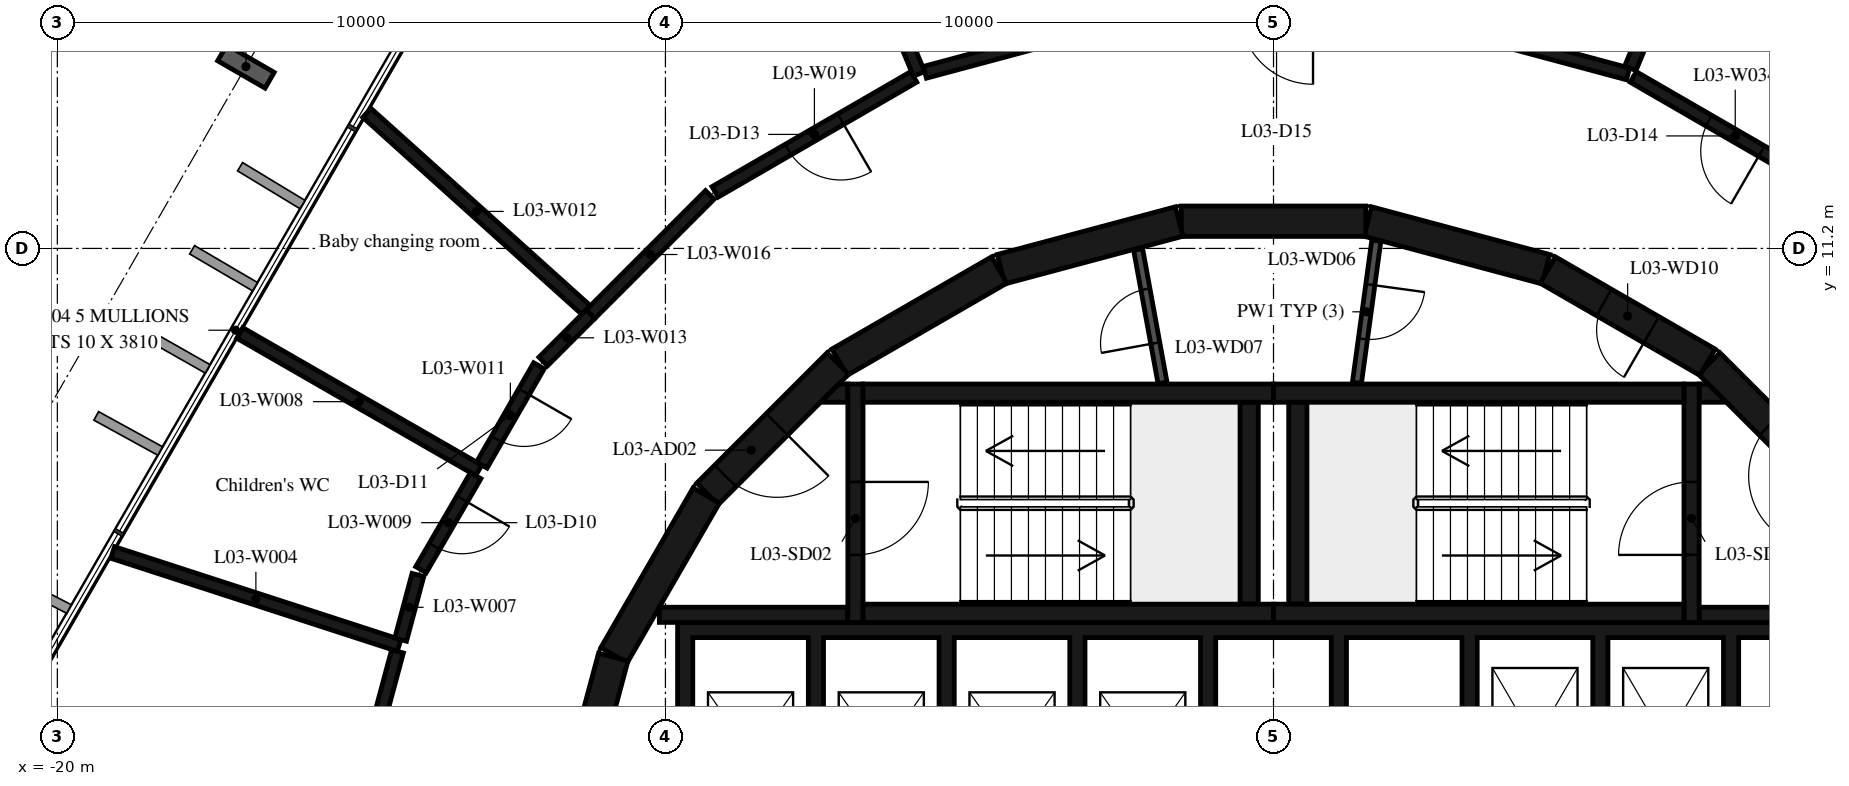
"""IFC4 building model, lengths in metres.
Left out: names, types, materials, properties, quantities, classifications, styles, units other than length and angle.
Written with IfcOpenShell. Run it as: python <this file> out.ifc"""

import sys

from ifc_helpers import new_model, si_unit, direction, frame, frame_2d, origin, origin_2d, place, context, subcontext, project, spatial, polyline, rectangle, i_section, outline, extrude, element, fill, save


model = new_model("IFC4")
c1 = context("Model", 3, precision=1e-05, world=origin(), true_north=direction((0.0, 1.0)))
c2 = subcontext(c1, "Body", "Model", "MODEL_VIEW")
j1 = project(units=[si_unit("LENGTHUNIT", "METRE"), si_unit("PLANEANGLEUNIT", "RADIAN")], contexts=[c1])
p1 = place(None, origin())
s1 = spatial("IfcSite", under=j1, at=p1, CompositionType="ELEMENT")
p2 = place(p1, origin())
s2 = spatial("IfcBuilding", under=s1, at=p2, CompositionType="ELEMENT")
p3 = place(p2, frame((0.0, 0.0, 18.6)))
s3 = spatial("IfcBuildingStorey", under=s2, at=p3, CompositionType="ELEMENT", Elevation=18.6)
p4 = place(p3, frame((-16.899, 14.19, -0.38), z_axis=(0.0, 0.0, 1.0), x_axis=(0.50000017485, 0.866025302835, 0.0)))
e1 = element("IfcColumn", 1, at=p4, inside=s3, PredefinedType="COLUMN", context=c2, shape_type="SweptSolid", body=[
    extrude(i_section(OverallWidth=0.3, OverallDepth=0.9, WebThickness=0.019, FlangeThickness=0.035, FilletRadius=0.03, at=origin_2d()), origin(), (0.0, 0.0, 1.0), 4.8),
])
p5 = place(p3, frame((9.308, 7.164, 0.0), z_axis=(0.0, 0.0, 1.0), x_axis=(-0.707106781187, 0.707106781187, 0.0)))
e2 = element("IfcWall", 2, at=p5, inside=s3, PredefinedType="SHEAR", context=c2, shape_type="SweptSolid", body=[
    extrude(rectangle(XDim=3.032, YDim=0.5, at=frame_2d((1.516, 0.0))), origin(), (0.0, 0.0, 1.0), 4.42),
])
p6 = place(p5, frame((0.416, 0.0, 0.0)))
e3 = element("IfcOpeningElement", 3, at=p6, cuts=e2, PredefinedType="OPENING", context=c2, shape_type="SweptSolid", body=[
    extrude(rectangle(XDim=1.2, YDim=2.1, at=frame_2d((0.6, 1.05))), frame((0.0, 0.26, 0.0), z_axis=(0.0, -1.0, 0.0), x_axis=(1.0, 0.0, 0.0)), (0.0, 0.0, 1.0), 0.52),
])
p7 = place(p3, frame((7.137, 9.329, 0.0), z_axis=(0.0, 0.0, 1.0), x_axis=(-0.865975092491, 0.500087131594, 0.0)))
e4 = element("IfcWall", 4, at=p7, inside=s3, PredefinedType="SHEAR", context=c2, shape_type="SweptSolid", body=[
    extrude(rectangle(XDim=3.033, YDim=0.5, at=frame_2d((1.516, 0.0))), origin(), (0.0, 0.0, 1.0), 4.42),
])
p8 = place(p7, frame((1.066, 0.0, 0.0)))
e5 = element("IfcOpeningElement", 5, at=p8, cuts=e4, PredefinedType="OPENING", context=c2, shape_type="SweptSolid", body=[
    extrude(rectangle(XDim=0.9, YDim=2.1, at=frame_2d((0.45, 1.05))), frame((0.0, 0.26, 0.0), z_axis=(0.0, -1.0, 0.0), x_axis=(1.0, 0.0, 0.0)), (0.0, 0.0, 1.0), 0.52),
])
for number, where, z_axis, x_axis in (
    (6, (4.479, 10.858, 0.0), (0.0, 0.0, 1.0), (-0.966, 0.259, 0.0)),
    (7, (1.516, 11.647, 0.0), (0.0, 0.0, 1.0), (-1.0, 0.0, 0.0)),
    (8, (-1.55, 11.643, 0.0), (0.0, 0.0, 1.0), (-0.966, -0.259, 0.0)),
    (9, (-4.51, 10.845, 0.0), (0.0, 0.0, 1.0), (-0.866, -0.5, 0.0)),
):
    element("IfcWall", number, at=place(p3, frame(where, z_axis=z_axis, x_axis=x_axis)), inside=s3, PredefinedType="SHEAR", context=c2, shape_type="SweptSolid", body=[
        extrude(rectangle(XDim=3.033, YDim=0.5, at=frame_2d((1.516, 0.0))), origin(), (0.0, 0.0, 1.0), 4.42),
    ])
p9 = place(p3, frame((-7.164, 9.308, 0.0), z_axis=(0.0, 0.0, 1.0), x_axis=(-0.707106781187, -0.707106781187, 0.0)))
e10 = element("IfcWall", 10, at=p9, inside=s3, PredefinedType="SHEAR", context=c2, shape_type="SweptSolid", body=[
    extrude(rectangle(XDim=3.032, YDim=0.5, at=frame_2d((1.516, 0.0))), origin(), (0.0, 0.0, 1.0), 4.42),
])
p10 = place(p9, frame((1.416, 0.0, 0.0)))
e11 = element("IfcOpeningElement", 11, at=p10, cuts=e10, PredefinedType="OPENING", context=c2, shape_type="SweptSolid", body=[
    extrude(rectangle(XDim=1.2, YDim=2.1, at=frame_2d((0.6, 1.05))), frame((0.0, 0.26, 0.0), z_axis=(0.0, -1.0, 0.0), x_axis=(1.0, 0.0, 0.0)), (0.0, 0.0, 1.0), 0.52),
])
for number, where, z_axis, x_axis in (
    (12, (-9.329, 7.137, 0.0), (0.0, 0.0, 1.0), (-0.5, -0.866, 0.0)),
    (13, (-10.858, 4.479, 0.0), (0.0, 0.0, 1.0), (-0.259, -0.966, 0.0)),
):
    element("IfcWall", number, at=place(p3, frame(where, z_axis=z_axis, x_axis=x_axis)), inside=s3, PredefinedType="SHEAR", context=c2, shape_type="SweptSolid", body=[
        extrude(rectangle(XDim=3.033, YDim=0.5, at=frame_2d((1.516, 0.0))), origin(), (0.0, 0.0, 1.0), 4.42),
    ])
for number, where, z_axis, x_axis in (
    (14, (0.0, 5.2, 0.0), (0.0, 0.0, 1.0), (1.0, 0.0, 0.0)),
    (15, (0.0, 8.82, 0.0), (0.0, 0.0, 1.0), (1.0, 0.0, 0.0)),
):
    element("IfcWall", number, at=place(p3, frame(where, z_axis=z_axis, x_axis=x_axis)), inside=s3, PredefinedType="SHEAR", context=c2, shape_type="SweptSolid", body=[
        extrude(rectangle(XDim=6.75, YDim=0.3, at=frame_2d((3.375, 0.0))), origin(), (0.0, 0.0, 1.0), 4.42),
    ])
p11 = place(p3, frame((0.4, 5.35, 0.0), z_axis=(0.0, 0.0, 1.0), x_axis=(0.0, 1.0, 0.0)))
e16 = element("IfcWall", 16, at=p11, inside=s3, PredefinedType="SHEAR", context=c2, shape_type="SweptSolid", body=[
    extrude(rectangle(XDim=3.32, YDim=0.3, at=frame_2d((1.66, 0.0))), origin(), (0.0, 0.0, 1.0), 4.42),
])
p12 = place(p3, frame((6.875, 5.05, 0.0), z_axis=(0.0, 0.0, 1.0), x_axis=(0.0, 1.0, 0.0)))
e17 = element("IfcWall", 17, at=p12, inside=s3, PredefinedType="SHEAR", context=c2, shape_type="SweptSolid", body=[
    extrude(rectangle(XDim=3.92, YDim=0.25, at=frame_2d((1.96, 0.0))), origin(), (0.0, 0.0, 1.0), 4.42),
])
p13 = place(p12, frame((1.11, 0.0, 0.0)))
e18 = element("IfcOpeningElement", 18, at=p13, cuts=e17, PredefinedType="OPENING", context=c2, shape_type="SweptSolid", body=[
    extrude(rectangle(XDim=1.2, YDim=2.1, at=frame_2d((0.6, 1.05))), frame((0.0, 0.135, 0.0), z_axis=(0.0, -1.0, 0.0), x_axis=(1.0, 0.0, 0.0)), (0.0, 0.0, 1.0), 0.27),
])
p14 = place(p3, frame((7.0, 5.175, 0.0), z_axis=(0.0, 0.0, 1.0), x_axis=(1.0, 0.0, 0.0)))
e19 = element("IfcWall", 19, at=p14, inside=s3, PredefinedType="SHEAR", context=c2, shape_type="SweptSolid", body=[
    extrude(rectangle(XDim=3.1, YDim=0.25, at=frame_2d((1.55, 0.0))), origin(), (0.0, 0.0, 1.0), 4.42),
])
p15 = place(p3, origin())
e20 = element("IfcWall", 20, at=p15, inside=s3, PredefinedType="SHEAR", context=c2, shape_type="SweptSolid", body=[
    extrude(outline(polyline([(7.448, 8.67), (7.0, 8.67), (7.0, 8.97), (7.148, 8.97), (7.448, 8.67)])), origin(), (0.0, 0.0, 1.0), 4.42),
])
for number, where, z_axis, x_axis in (
    (21, (-6.75, 5.2, 0.0), (0.0, 0.0, 1.0), (1.0, 0.0, 0.0)),
    (22, (-6.75, 8.82, 0.0), (0.0, 0.0, 1.0), (1.0, 0.0, 0.0)),
):
    element("IfcWall", number, at=place(p3, frame(where, z_axis=z_axis, x_axis=x_axis)), inside=s3, PredefinedType="SHEAR", context=c2, shape_type="SweptSolid", body=[
        extrude(rectangle(XDim=6.75, YDim=0.3, at=frame_2d((3.375, 0.0))), origin(), (0.0, 0.0, 1.0), 4.42),
    ])
p16 = place(p3, frame((-0.4, 5.35, 0.0), z_axis=(0.0, 0.0, 1.0), x_axis=(0.0, 1.0, 0.0)))
e23 = element("IfcWall", 23, at=p16, inside=s3, PredefinedType="SHEAR", context=c2, shape_type="SweptSolid", body=[
    extrude(rectangle(XDim=3.32, YDim=0.3, at=frame_2d((1.66, 0.0))), origin(), (0.0, 0.0, 1.0), 4.42),
])
p17 = place(p3, frame((-6.875, 8.97, 0.0), z_axis=(0.0, 0.0, 1.0), x_axis=(0.0, -1.0, 0.0)))
e24 = element("IfcWall", 24, at=p17, inside=s3, PredefinedType="SHEAR", context=c2, shape_type="SweptSolid", body=[
    extrude(rectangle(XDim=3.92, YDim=0.25, at=frame_2d((1.96, 0.0))), origin(), (0.0, 0.0, 1.0), 4.42),
])
p18 = place(p17, frame((1.61, 0.0, 0.0)))
e25 = element("IfcOpeningElement", 25, at=p18, cuts=e24, PredefinedType="OPENING", context=c2, shape_type="SweptSolid", body=[
    extrude(rectangle(XDim=1.2, YDim=2.1, at=frame_2d((0.6, 1.05))), frame((0.0, 0.135, 0.0), z_axis=(0.0, -1.0, 0.0), x_axis=(1.0, 0.0, 0.0)), (0.0, 0.0, 1.0), 0.27),
])
p19 = place(p3, frame((-7.0, 5.175, 0.0), z_axis=(0.0, 0.0, 1.0), x_axis=(-1.0, 0.0, 0.0)))
e26 = element("IfcWall", 26, at=p19, inside=s3, PredefinedType="SHEAR", context=c2, shape_type="SweptSolid", body=[
    extrude(rectangle(XDim=3.1, YDim=0.25, at=frame_2d((1.55, 0.0))), origin(), (0.0, 0.0, 1.0), 4.42),
])
p20 = place(p3, origin())
e27 = element("IfcWall", 27, at=p20, inside=s3, PredefinedType="SHEAR", context=c2, shape_type="SweptSolid", body=[
    extrude(outline(polyline([(-7.148, 8.97), (-7.0, 8.97), (-7.0, 8.67), (-7.448, 8.67), (-7.148, 8.97)])), origin(), (0.0, 0.0, 1.0), 4.42),
])
p21 = place(p3, origin())
e28 = element("IfcWall", 28, at=p21, inside=s3, PredefinedType="SHEAR", context=c2, shape_type="SweptSolid", body=[
    extrude(outline(polyline([(-9.55, 4.8), (-7.65, 4.8), (-7.65, 1.9), (-7.4, 1.9), (-7.4, 4.8), (-5.5, 4.8), (-5.5, 1.9), (-5.25, 1.9), (-5.25, 4.8), (-3.35, 4.8), (-3.35, 1.9), (-3.1, 1.9), (-3.1, 4.8), (-1.2, 4.8), (-1.2, 1.9), (-0.95, 1.9), (-0.95, 4.8), (0.95, 4.8), (0.95, 1.9), (1.2, 1.9), (1.2, 4.8), (3.1, 4.8), (3.1, 1.9), (3.35, 1.9), (3.35, 4.8), (5.25, 4.8), (5.25, 1.9), (5.5, 1.9), (5.5, 4.8), (7.4, 4.8), (7.4, 1.9), (7.65, 1.9), (7.65, 4.8), (9.55, 4.8), (9.55, 1.9), (9.8, 1.9), (9.8, 4.8), (9.8, 5.05), (-9.8, 5.05), (-9.8, 4.8), (-9.8, 1.9), (-9.55, 1.9), (-9.55, 4.8)])), origin(), (0.0, 0.0, 1.0), 4.42),
])
p22 = place(p3, frame((1.691, 11.326, 0.0), z_axis=(0.0, 0.0, 1.0), x_axis=(-0.135344253201, -0.990798633994, 0.0)))
e29 = element("IfcWall", 29, at=p22, inside=s3, PredefinedType="PARTITIONING", context=c2, shape_type="SweptSolid", body=[
    extrude(rectangle(XDim=2.358, YDim=0.15, at=frame_2d((1.179, 0.0))), origin(), (0.0, 0.0, 1.0), 4.42),
])
p23 = place(p22, frame((0.729, 0.0, 0.0)))
e30 = element("IfcOpeningElement", 30, at=p23, cuts=e29, PredefinedType="OPENING", context=c2, shape_type="SweptSolid", body=[
    extrude(rectangle(XDim=0.9, YDim=2.1, at=frame_2d((0.45, 1.05))), frame((0.0, 0.085, 0.0), z_axis=(0.0, -1.0, 0.0), x_axis=(1.0, 0.0, 0.0)), (0.0, 0.0, 1.0), 0.17),
])
p24 = place(p3, frame((-1.825, 8.99, 0.0), z_axis=(0.0, 0.0, 1.0), x_axis=(-0.179955206115, 0.983674805915, 0.0)))
e31 = element("IfcWall", 31, at=p24, inside=s3, PredefinedType="PARTITIONING", context=c2, shape_type="SweptSolid", body=[
    extrude(rectangle(XDim=2.229, YDim=0.15, at=frame_2d((1.115, 0.0))), origin(), (0.0, 0.0, 1.0), 4.42),
])
p25 = place(p24, frame((0.665, 0.0, 0.0)))
e32 = element("IfcOpeningElement", 32, at=p25, cuts=e31, PredefinedType="OPENING", context=c2, shape_type="SweptSolid", body=[
    extrude(rectangle(XDim=0.9, YDim=2.1, at=frame_2d((0.45, 1.05))), frame((0.0, 0.085, 0.0), z_axis=(0.0, -1.0, 0.0), x_axis=(1.0, 0.0, 0.0)), (0.0, 0.0, 1.0), 0.17),
])
p26 = place(p3, frame((-14.38, 4.67, 0.0), z_axis=(0.0, 0.0, 1.0), x_axis=(-0.951080790776, 0.308942275219, 0.0)))
e33 = element("IfcWall", 33, at=p26, inside=s3, PredefinedType="PARTITIONING", context=c2, shape_type="SweptSolid", body=[
    extrude(rectangle(XDim=4.952, YDim=0.2, at=frame_2d((2.476, 0.0))), origin(), (0.0, 0.0, 1.0), 4.03),
])
p27 = place(p3, frame((-14.406, 4.573, 0.0), z_axis=(0.0, 0.0, 1.0), x_axis=(-0.259408996071, -0.965767556277, 0.0)))
e34 = element("IfcWall", 34, at=p27, inside=s3, PredefinedType="PARTITIONING", context=c2, shape_type="SweptSolid", body=[
    extrude(rectangle(XDim=2.575, YDim=0.2, at=frame_2d((1.288, 0.0))), origin(), (0.0, 0.0, 1.0), 4.42),
])
p28 = place(p3, frame((-14.07, 5.83, 0.0), z_axis=(0.0, 0.0, 1.0), x_axis=(-0.258159565639, -0.966102292032, 0.0)))
e35 = element("IfcWall", 35, at=p28, inside=s3, PredefinedType="PARTITIONING", context=c2, shape_type="SweptSolid", body=[
    extrude(rectangle(XDim=1.101, YDim=0.2, at=frame_2d((0.55, 0.0))), origin(), (0.0, 0.0, 1.0), 4.42),
])
p29 = place(p3, frame((-13.07, 7.55, 0.0), z_axis=(0.0, 0.0, 1.0), x_axis=(-0.866877794005, 0.498520701938, 0.0)))
e36 = element("IfcWall", 36, at=p29, inside=s3, PredefinedType="PARTITIONING", context=c2, shape_type="SweptSolid", body=[
    extrude(rectangle(XDim=4.533, YDim=0.2, at=frame_2d((2.267, 0.0))), origin(), (0.0, 0.0, 1.0), 4.42),
])
p30 = place(p3, frame((-13.12, 7.464, 0.0), z_axis=(0.0, 0.0, 1.0), x_axis=(-0.502589631847, -0.864525107767, 0.0)))
e37 = element("IfcWall", 37, at=p30, inside=s3, PredefinedType="PARTITIONING", context=c2, shape_type="SweptSolid", body=[
    extrude(rectangle(XDim=1.79, YDim=0.2, at=frame_2d((0.895, 0.0))), origin(), (0.0, 0.0, 1.0), 4.42),
])
p31 = place(p30, frame((0.445, 0.0, 0.0)))
e38 = element("IfcOpeningElement", 38, at=p31, cuts=e37, PredefinedType="OPENING", context=c2, shape_type="SweptSolid", body=[
    extrude(rectangle(XDim=0.9, YDim=2.1, at=frame_2d((0.45, 1.05))), frame((0.0, 0.11, 0.0), z_axis=(0.0, -1.0, 0.0), x_axis=(1.0, 0.0, 0.0)), (0.0, 0.0, 1.0), 0.22),
])
p32 = place(p3, frame((-12.08, 9.27, 0.0), z_axis=(0.0, 0.0, 1.0), x_axis=(-0.49878752461, -0.86672429601, 0.0)))
e39 = element("IfcWall", 39, at=p32, inside=s3, PredefinedType="PARTITIONING", context=c2, shape_type="SweptSolid", body=[
    extrude(rectangle(XDim=1.885, YDim=0.2, at=frame_2d((0.942, 0.0))), origin(), (0.0, 0.0, 1.0), 4.42),
])
p33 = place(p32, frame((0.492, 0.0, 0.0)))
e40 = element("IfcOpeningElement", 40, at=p33, cuts=e39, PredefinedType="OPENING", context=c2, shape_type="SweptSolid", body=[
    extrude(rectangle(XDim=0.9, YDim=2.1, at=frame_2d((0.45, 1.05))), frame((0.0, 0.11, 0.0), z_axis=(0.0, -1.0, 0.0), x_axis=(1.0, 0.0, 0.0)), (0.0, 0.0, 1.0), 0.22),
])
p34 = place(p3, frame((-11.304, 10.187, 0.0), z_axis=(0.0, 0.0, 1.0), x_axis=(-0.743474354937, 0.668764445489, 0.0)))
e41 = element("IfcWall", 41, at=p34, inside=s3, PredefinedType="PARTITIONING", context=c2, shape_type="SweptSolid", body=[
    extrude(rectangle(XDim=4.849, YDim=0.2, at=frame_2d((2.425, 0.0))), origin(), (0.0, 0.0, 1.0), 4.03),
])
p35 = place(p3, frame((-11.23, 10.12, 0.0), z_axis=(0.0, 0.0, 1.0), x_axis=(-0.707106781187, -0.707106781187, 0.0)))
e42 = element("IfcWall", 42, at=p35, inside=s3, PredefinedType="PARTITIONING", context=c2, shape_type="SweptSolid", body=[
    extrude(rectangle(XDim=1.102, YDim=0.2, at=frame_2d((0.551, 0.0))), origin(), (0.0, 0.0, 1.0), 4.42),
])
p36 = place(p3, frame((-9.27, 12.08, 0.0), z_axis=(0.0, 0.0, 1.0), x_axis=(-0.707106781187, -0.707106781187, 0.0)))
e43 = element("IfcWall", 43, at=p36, inside=s3, PredefinedType="PARTITIONING", context=c2, shape_type="SweptSolid", body=[
    extrude(rectangle(XDim=2.772, YDim=0.2, at=frame_2d((1.386, 0.0))), origin(), (0.0, 0.0, 1.0), 4.42),
])
p37 = place(p3, frame((-5.83, 14.07, 0.0), z_axis=(0.0, 0.0, 1.0), x_axis=(-0.382588257379, 0.923918949538, 0.0)))
e44 = element("IfcWall", 44, at=p37, inside=s3, PredefinedType="PARTITIONING", context=c2, shape_type="SweptSolid", body=[
    extrude(rectangle(XDim=9.514, YDim=0.2, at=frame_2d((4.757, 0.0))), origin(), (0.0, 0.0, 1.0), 4.42),
])
p38 = place(p3, frame((-5.917, 14.02, 0.0), z_axis=(0.0, 0.0, 1.0), x_axis=(-0.865591582237, -0.500750649286, 0.0)))
e45 = element("IfcWall", 45, at=p38, inside=s3, PredefinedType="PARTITIONING", context=c2, shape_type="SweptSolid", body=[
    extrude(rectangle(XDim=3.774, YDim=0.2, at=frame_2d((1.887, 0.0))), origin(), (0.0, 0.0, 1.0), 4.42),
])
p39 = place(p38, frame((1.387, 0.0, 0.0)))
e46 = element("IfcOpeningElement", 46, at=p39, cuts=e45, PredefinedType="OPENING", context=c2, shape_type="SweptSolid", body=[
    extrude(rectangle(XDim=1.0, YDim=2.1, at=frame_2d((0.5, 1.05))), frame((0.0, 0.11, 0.0), z_axis=(0.0, -1.0, 0.0), x_axis=(1.0, 0.0, 0.0)), (0.0, 0.0, 1.0), 0.22),
])
for number, where, z_axis, x_axis in (
    (47, (-1.99, 15.1, 0.0), (0.0, 0.0, 1.0), (-0.966, -0.259, 0.0)),
    (48, (5.83, 14.07, 0.0), (0.0, 0.0, 1.0), (-0.966, 0.259, 0.0)),
):
    element("IfcWall", number, at=place(p3, frame(where, z_axis=z_axis, x_axis=x_axis)), inside=s3, PredefinedType="PARTITIONING", context=c2, shape_type="SweptSolid", body=[
        extrude(rectangle(XDim=3.876, YDim=0.2, at=frame_2d((1.938, 0.0))), origin(), (0.0, 0.0, 1.0), 4.42),
    ])
p40 = place(p3, frame((9.27, 12.08, 0.0), z_axis=(0.0, 0.0, 1.0), x_axis=(-0.865601686425, 0.500733182901, 0.0)))
e49 = element("IfcWall", 49, at=p40, inside=s3, PredefinedType="PARTITIONING", context=c2, shape_type="SweptSolid", body=[
    extrude(rectangle(XDim=3.874, YDim=0.2, at=frame_2d((1.937, 0.0))), origin(), (0.0, 0.0, 1.0), 4.42),
])
p41 = place(p40, frame((1.437, 0.0, 0.0)))
e50 = element("IfcOpeningElement", 50, at=p41, cuts=e49, PredefinedType="OPENING", context=c2, shape_type="SweptSolid", body=[
    extrude(rectangle(XDim=1.0, YDim=2.1, at=frame_2d((0.5, 1.05))), frame((0.0, 0.11, 0.0), z_axis=(0.0, -1.0, 0.0), x_axis=(1.0, 0.0, 0.0)), (0.0, 0.0, 1.0), 0.22),
])
p42 = place(p3, frame((9.47, 22.86, 0.0), z_axis=(0.0, 0.0, 1.0), x_axis=(-0.382599926304, -0.923914117433, 0.0)))
e51 = element("IfcWall", 51, at=p42, inside=s3, PredefinedType="PARTITIONING", context=c2, shape_type="SweptSolid", body=[
    extrude(rectangle(XDim=9.414, YDim=0.2, at=frame_2d((4.707, 0.0))), origin(), (0.0, 0.0, 1.0), 4.42),
])
p43 = place(p13, origin())
e52 = element("IfcDoor", 52, at=p43, inside=s3, OperationType="SINGLE_SWING_LEFT", PredefinedType="DOOR", context=c2, shape_type="SweptSolid", body=[
    extrude(rectangle(XDim=1.2, YDim=2.1, at=frame_2d((0.6, 1.05))), frame((0.0, 0.025, 0.0), z_axis=(0.0, -1.0, 0.0), x_axis=(1.0, 0.0, 0.0)), (0.0, 0.0, 1.0), 0.05),
])
fill(e18, e52)
p44 = place(p6, origin())
e53 = element("IfcDoor", 53, at=p44, inside=s3, OperationType="SINGLE_SWING_RIGHT", PredefinedType="DOOR", context=c2, shape_type="SweptSolid", body=[
    extrude(rectangle(XDim=1.2, YDim=2.1, at=frame_2d((0.6, 1.05))), frame((0.0, 0.025, 0.0), z_axis=(0.0, -1.0, 0.0), x_axis=(1.0, 0.0, 0.0)), (0.0, 0.0, 1.0), 0.05),
])
fill(e3, e53)
p45 = place(p18, origin())
e54 = element("IfcDoor", 54, at=p45, inside=s3, OperationType="SINGLE_SWING_LEFT", PredefinedType="DOOR", context=c2, shape_type="SweptSolid", body=[
    extrude(rectangle(XDim=1.2, YDim=2.1, at=frame_2d((0.6, 1.05))), frame((0.0, 0.025, 0.0), z_axis=(0.0, -1.0, 0.0), x_axis=(1.0, 0.0, 0.0)), (0.0, 0.0, 1.0), 0.05),
])
fill(e25, e54)
p46 = place(p10, origin())
e55 = element("IfcDoor", 55, at=p46, inside=s3, OperationType="SINGLE_SWING_RIGHT", PredefinedType="DOOR", context=c2, shape_type="SweptSolid", body=[
    extrude(rectangle(XDim=1.2, YDim=2.1, at=frame_2d((0.6, 1.05))), frame((0.0, 0.025, 0.0), z_axis=(0.0, -1.0, 0.0), x_axis=(1.0, 0.0, 0.0)), (0.0, 0.0, 1.0), 0.05),
])
fill(e11, e55)
p47 = place(p23, origin())
e56 = element("IfcDoor", 56, at=p47, inside=s3, OperationType="SINGLE_SWING_LEFT", PredefinedType="DOOR", context=c2, shape_type="SweptSolid", body=[
    extrude(rectangle(XDim=0.9, YDim=2.1, at=frame_2d((0.45, 1.05))), frame((0.0, 0.025, 0.0), z_axis=(0.0, -1.0, 0.0), x_axis=(1.0, 0.0, 0.0)), (0.0, 0.0, 1.0), 0.05),
])
fill(e30, e56)
p48 = place(p25, origin())
e57 = element("IfcDoor", 57, at=p48, inside=s3, OperationType="SINGLE_SWING_RIGHT", PredefinedType="DOOR", context=c2, shape_type="SweptSolid", body=[
    extrude(rectangle(XDim=0.9, YDim=2.1, at=frame_2d((0.45, 1.05))), frame((0.0, 0.025, 0.0), z_axis=(0.0, -1.0, 0.0), x_axis=(1.0, 0.0, 0.0)), (0.0, 0.0, 1.0), 0.05),
])
fill(e32, e57)
p49 = place(p8, origin())
e58 = element("IfcDoor", 58, at=p49, inside=s3, OperationType="SINGLE_SWING_LEFT", PredefinedType="DOOR", context=c2, shape_type="SweptSolid", body=[
    extrude(rectangle(XDim=0.9, YDim=2.1, at=frame_2d((0.45, 1.05))), frame((0.0, 0.025, 0.0), z_axis=(0.0, -1.0, 0.0), x_axis=(1.0, 0.0, 0.0)), (0.0, 0.0, 1.0), 0.05),
])
fill(e5, e58)
p50 = place(p31, origin())
e59 = element("IfcDoor", 59, at=p50, inside=s3, OperationType="SINGLE_SWING_LEFT", PredefinedType="DOOR", context=c2, shape_type="SweptSolid", body=[
    extrude(rectangle(XDim=0.9, YDim=2.1, at=frame_2d((0.45, 1.05))), frame((0.0, 0.025, 0.0), z_axis=(0.0, -1.0, 0.0), x_axis=(1.0, 0.0, 0.0)), (0.0, 0.0, 1.0), 0.05),
])
fill(e38, e59)
p51 = place(p33, origin())
e60 = element("IfcDoor", 60, at=p51, inside=s3, OperationType="SINGLE_SWING_LEFT", PredefinedType="DOOR", context=c2, shape_type="SweptSolid", body=[
    extrude(rectangle(XDim=0.9, YDim=2.1, at=frame_2d((0.45, 1.05))), frame((0.0, 0.025, 0.0), z_axis=(0.0, -1.0, 0.0), x_axis=(1.0, 0.0, 0.0)), (0.0, 0.0, 1.0), 0.05),
])
fill(e40, e60)
p52 = place(p39, origin())
e61 = element("IfcDoor", 61, at=p52, inside=s3, OperationType="SINGLE_SWING_LEFT", PredefinedType="DOOR", context=c2, shape_type="SweptSolid", body=[
    extrude(rectangle(XDim=1.0, YDim=2.1, at=frame_2d((0.5, 1.05))), frame((0.0, 0.025, 0.0), z_axis=(0.0, -1.0, 0.0), x_axis=(1.0, 0.0, 0.0)), (0.0, 0.0, 1.0), 0.05),
])
fill(e46, e61)
p53 = place(p41, origin())
e62 = element("IfcDoor", 62, at=p53, inside=s3, OperationType="SINGLE_SWING_LEFT", PredefinedType="DOOR", context=c2, shape_type="SweptSolid", body=[
    extrude(rectangle(XDim=1.0, YDim=2.1, at=frame_2d((0.5, 1.05))), frame((0.0, 0.025, 0.0), z_axis=(0.0, -1.0, 0.0), x_axis=(1.0, 0.0, 0.0)), (0.0, 0.0, 1.0), 0.05),
])
fill(e50, e62)
save(model, sys.argv[1])
